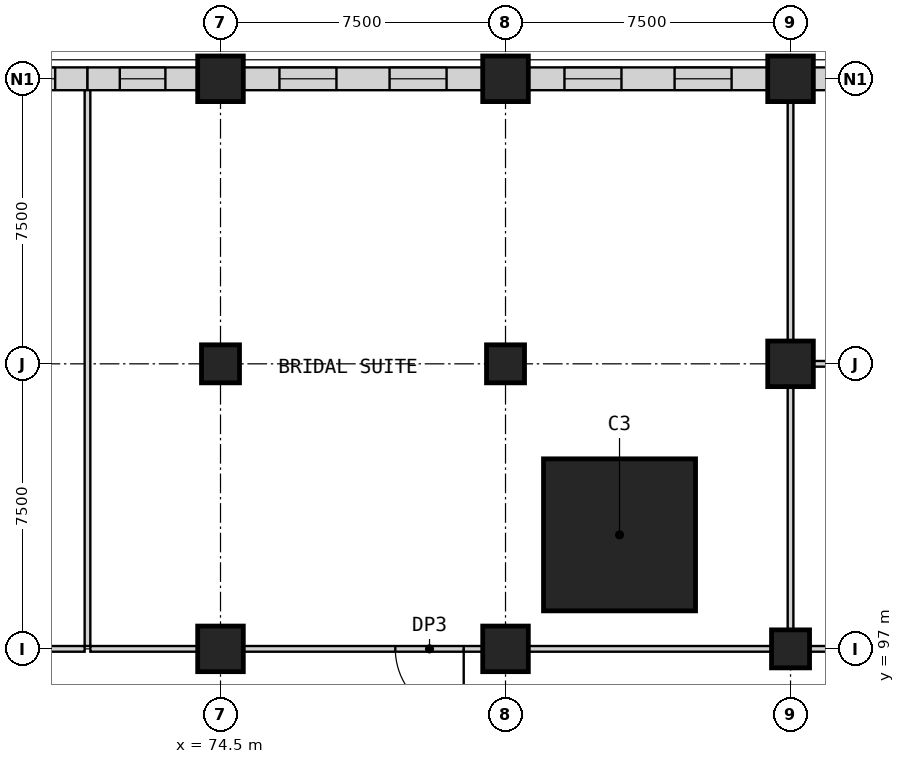
"""IFC4 building model, lengths in metres.
Left out: names, types, materials, properties, quantities, classifications, styles, units other than length and angle.
Written with IfcOpenShell. Run it as: python <this file> out.ifc"""

import sys

from ifc_helpers import new_model, si_unit, direction, frame, frame_2d, origin, origin_2d, place, context, subcontext, project, spatial, rectangle, extrude, element, fill, save


model = new_model("IFC4")
c1 = context("Model", 3, precision=1e-05, world=origin(), true_north=direction((0.0, 1.0)))
c2 = subcontext(c1, "Body", "Model", "MODEL_VIEW")
j1 = project(units=[si_unit("LENGTHUNIT", "METRE"), si_unit("PLANEANGLEUNIT", "RADIAN")], contexts=[c1])
p1 = place(None, origin())
s1 = spatial("IfcSite", under=j1, at=p1, CompositionType="ELEMENT")
p2 = place(p1, origin())
s2 = spatial("IfcBuilding", under=s1, at=p2, CompositionType="ELEMENT")
p3 = place(p2, frame((0.0, 0.0, 23.5)))
s3 = spatial("IfcBuildingStorey", under=s2, at=p3, CompositionType="ELEMENT", Elevation=23.5)
p4 = place(p3, frame((74.5, 97.0, 0.0), z_axis=(0.0, 0.0, 1.0), x_axis=(1.0, 0.0, 0.0)))
e1 = element("IfcColumn", 1, at=p4, inside=s3, PredefinedType="COLUMN", context=c2, shape_type="SweptSolid", body=[
    extrude(rectangle(XDim=1.2, YDim=1.2, at=origin_2d()), origin(), (0.0, 0.0, 1.0), 5.5),
])
p5 = place(p3, frame((74.5, 104.5, 0.0), z_axis=(0.0, 0.0, 1.0), x_axis=(1.0, 0.0, 0.0)))
e2 = element("IfcColumn", 2, at=p5, inside=s3, PredefinedType="COLUMN", context=c2, shape_type="SweptSolid", body=[
    extrude(rectangle(XDim=1.0, YDim=1.0, at=origin_2d()), origin(), (0.0, 0.0, 1.0), 5.5),
])
p6 = place(p3, frame((82.0, 97.0, 0.0), z_axis=(0.0, 0.0, 1.0), x_axis=(1.0, 0.0, 0.0)))
e3 = element("IfcColumn", 3, at=p6, inside=s3, PredefinedType="COLUMN", context=c2, shape_type="SweptSolid", body=[
    extrude(rectangle(XDim=1.2, YDim=1.2, at=origin_2d()), origin(), (0.0, 0.0, 1.0), 5.5),
])
for number, where, z_axis, x_axis in (
    (4, (82.0, 104.5, 0.0), (0.0, 0.0, 1.0), (1.0, 0.0, 0.0)),
    (5, (89.5, 97.0, 0.0), (0.0, 0.0, 1.0), (1.0, 0.0, 0.0)),
):
    element("IfcColumn", number, at=place(p3, frame(where, z_axis=z_axis, x_axis=x_axis)), inside=s3, PredefinedType="COLUMN", context=c2, shape_type="SweptSolid", body=[
        extrude(rectangle(XDim=1.0, YDim=1.0, at=origin_2d()), origin(), (0.0, 0.0, 1.0), 5.5),
    ])
p7 = place(p3, frame((85.0, 100.0, 0.0), z_axis=(0.0, 0.0, 1.0), x_axis=(1.0, 0.0, 0.0)))
e6 = element("IfcColumn", 6, at=p7, inside=s3, PredefinedType="COLUMN", context=c2, shape_type="SweptSolid", body=[
    extrude(rectangle(XDim=4.0, YDim=4.0, at=origin_2d()), origin(), (0.0, 0.0, 1.0), 5.5),
])
for number, where, z_axis, x_axis in (
    (7, (74.5, 112.0, 0.0), (0.0, 0.0, 1.0), (1.0, 0.0, 0.0)),
    (8, (82.0, 112.0, 0.0), (0.0, 0.0, 1.0), (1.0, 0.0, 0.0)),
    (9, (89.5, 104.5, 0.0), (0.0, 0.0, 1.0), (1.0, 0.0, 0.0)),
    (10, (89.5, 112.0, 0.0), (0.0, 0.0, 1.0), (1.0, 0.0, 0.0)),
):
    element("IfcColumn", number, at=place(p3, frame(where, z_axis=z_axis, x_axis=x_axis)), inside=s3, PredefinedType="COLUMN", context=c2, shape_type="SweptSolid", body=[
        extrude(rectangle(XDim=1.2, YDim=1.2, at=origin_2d()), origin(), (0.0, 0.0, 1.0), 5.5),
    ])
for number, where, z_axis, x_axis in (
    (11, (68.1, 97.0, 0.0), (0.0, 0.0, 1.0), (1.0, 0.0, 0.0)),
    (12, (71.075, 97.0, 0.0), (0.0, 0.0, 1.0), (1.0, 0.0, 0.0)),
):
    element("IfcWall", number, at=place(p3, frame(where, z_axis=z_axis, x_axis=x_axis)), inside=s3, PredefinedType="PARTITIONING", context=c2, shape_type="SweptSolid", body=[
        extrude(rectangle(XDim=2.825, YDim=0.15, at=frame_2d((1.413, 0.0))), origin(), (0.0, 0.0, 1.0), 5.2),
    ])
p8 = place(p3, frame((81.4, 97.0, 0.0), z_axis=(0.0, 0.0, 1.0), x_axis=(-1.0, 0.0, 0.0)))
e13 = element("IfcWall", 13, at=p8, inside=s3, PredefinedType="PARTITIONING", context=c2, shape_type="SweptSolid", body=[
    extrude(rectangle(XDim=6.3, YDim=0.15, at=frame_2d((3.15, 0.0))), origin(), (0.0, 0.0, 1.0), 5.2),
])
p9 = place(p8, frame((0.5, 0.0, 0.0)))
e14 = element("IfcOpeningElement", 14, at=p9, cuts=e13, PredefinedType="OPENING", context=c2, shape_type="SweptSolid", body=[
    extrude(rectangle(XDim=1.8, YDim=2.4, at=frame_2d((0.9, 1.2))), frame((0.0, 0.085, 0.0), z_axis=(0.0, -1.0, 0.0), x_axis=(1.0, 0.0, 0.0)), (0.0, 0.0, 1.0), 0.17),
])
for number, where, z_axis, x_axis in (
    (15, (82.6, 97.0, 0.0), (0.0, 0.0, 1.0), (1.0, 0.0, 0.0)),
    (16, (90.0, 97.0, 0.0), (0.0, 0.0, 1.0), (1.0, 0.0, 0.0)),
):
    element("IfcWall", number, at=place(p3, frame(where, z_axis=z_axis, x_axis=x_axis)), inside=s3, PredefinedType="PARTITIONING", context=c2, shape_type="SweptSolid", body=[
        extrude(rectangle(XDim=6.4, YDim=0.15, at=frame_2d((3.2, 0.0))), origin(), (0.0, 0.0, 1.0), 5.2),
    ])
p10 = place(p3, frame((68.1, 112.0, 0.0), z_axis=(0.0, 0.0, 1.0), x_axis=(1.0, 0.0, 0.0)))
e17 = element("IfcWall", 17, at=p10, inside=s3, PredefinedType="PARTITIONING", context=c2, shape_type="SweptSolid", body=[
    extrude(rectangle(XDim=2.9, YDim=0.6, at=frame_2d((1.45, 0.0))), origin(), (0.0, 0.0, 1.0), 4.6),
])
p11 = place(p10, frame((0.85, 0.0, 0.9)))
e18 = element("IfcOpeningElement", 18, at=p11, cuts=e17, PredefinedType="OPENING", context=c2, shape_type="SweptSolid", body=[
    extrude(rectangle(XDim=1.2, YDim=2.8, at=frame_2d((0.6, 1.4))), frame((0.0, 0.31, 0.0), z_axis=(0.0, -1.0, 0.0), x_axis=(1.0, 0.0, 0.0)), (0.0, 0.0, 1.0), 0.62),
])
p12 = place(p3, frame((71.0, 112.0, 0.0), z_axis=(0.0, 0.0, 1.0), x_axis=(1.0, 0.0, 0.0)))
e19 = element("IfcWall", 19, at=p12, inside=s3, PredefinedType="PARTITIONING", context=c2, shape_type="SweptSolid", body=[
    extrude(rectangle(XDim=2.9, YDim=0.6, at=frame_2d((1.45, 0.0))), origin(), (0.0, 0.0, 1.0), 4.6),
])
p13 = place(p12, frame((0.85, 0.0, 0.9)))
e20 = element("IfcOpeningElement", 20, at=p13, cuts=e19, PredefinedType="OPENING", context=c2, shape_type="SweptSolid", body=[
    extrude(rectangle(XDim=1.2, YDim=2.8, at=frame_2d((0.6, 1.4))), frame((0.0, 0.31, 0.0), z_axis=(0.0, -1.0, 0.0), x_axis=(1.0, 0.0, 0.0)), (0.0, 0.0, 1.0), 0.62),
])
p14 = place(p3, frame((75.1, 112.0, 0.0), z_axis=(0.0, 0.0, 1.0), x_axis=(1.0, 0.0, 0.0)))
e21 = element("IfcWall", 21, at=p14, inside=s3, PredefinedType="PARTITIONING", context=c2, shape_type="SweptSolid", body=[
    extrude(rectangle(XDim=6.3, YDim=0.6, at=frame_2d((3.15, 0.0))), origin(), (0.0, 0.0, 1.0), 4.6),
])
p15 = place(p14, frame((0.951, 0.0, 0.9)))
e22 = element("IfcOpeningElement", 22, at=p15, cuts=e21, PredefinedType="OPENING", context=c2, shape_type="SweptSolid", body=[
    extrude(rectangle(XDim=1.5, YDim=2.8, at=frame_2d((0.75, 1.4))), frame((0.0, 0.31, 0.0), z_axis=(0.0, -1.0, 0.0), x_axis=(1.0, 0.0, 0.0)), (0.0, 0.0, 1.0), 0.62),
])
p16 = place(p14, frame((3.849, 0.0, 0.9)))
e23 = element("IfcOpeningElement", 23, at=p16, cuts=e21, PredefinedType="OPENING", context=c2, shape_type="SweptSolid", body=[
    extrude(rectangle(XDim=1.5, YDim=2.8, at=frame_2d((0.75, 1.4))), frame((0.0, 0.31, 0.0), z_axis=(0.0, -1.0, 0.0), x_axis=(1.0, 0.0, 0.0)), (0.0, 0.0, 1.0), 0.62),
])
p17 = place(p3, frame((82.6, 112.0, 0.0), z_axis=(0.0, 0.0, 1.0), x_axis=(1.0, 0.0, 0.0)))
e24 = element("IfcWall", 24, at=p17, inside=s3, PredefinedType="PARTITIONING", context=c2, shape_type="SweptSolid", body=[
    extrude(rectangle(XDim=6.3, YDim=0.6, at=frame_2d((3.15, 0.0))), origin(), (0.0, 0.0, 1.0), 4.6),
])
p18 = place(p17, frame((0.951, 0.0, 0.9)))
e25 = element("IfcOpeningElement", 25, at=p18, cuts=e24, PredefinedType="OPENING", context=c2, shape_type="SweptSolid", body=[
    extrude(rectangle(XDim=1.5, YDim=2.8, at=frame_2d((0.75, 1.4))), frame((0.0, 0.31, 0.0), z_axis=(0.0, -1.0, 0.0), x_axis=(1.0, 0.0, 0.0)), (0.0, 0.0, 1.0), 0.62),
])
p19 = place(p17, frame((3.849, 0.0, 0.9)))
e26 = element("IfcOpeningElement", 26, at=p19, cuts=e24, PredefinedType="OPENING", context=c2, shape_type="SweptSolid", body=[
    extrude(rectangle(XDim=1.5, YDim=2.8, at=frame_2d((0.75, 1.4))), frame((0.0, 0.31, 0.0), z_axis=(0.0, -1.0, 0.0), x_axis=(1.0, 0.0, 0.0)), (0.0, 0.0, 1.0), 0.62),
])
p20 = place(p3, frame((90.1, 112.0, 0.0), z_axis=(0.0, 0.0, 1.0), x_axis=(1.0, 0.0, 0.0)))
e27 = element("IfcWall", 27, at=p20, inside=s3, PredefinedType="PARTITIONING", context=c2, shape_type="SweptSolid", body=[
    extrude(rectangle(XDim=6.3, YDim=0.6, at=frame_2d((3.15, 0.0))), origin(), (0.0, 0.0, 1.0), 4.6),
])
p21 = place(p20, frame((0.951, 0.0, 0.9)))
e28 = element("IfcOpeningElement", 28, at=p21, cuts=e27, PredefinedType="OPENING", context=c2, shape_type="SweptSolid", body=[
    extrude(rectangle(XDim=1.5, YDim=2.8, at=frame_2d((0.75, 1.4))), frame((0.0, 0.31, 0.0), z_axis=(0.0, -1.0, 0.0), x_axis=(1.0, 0.0, 0.0)), (0.0, 0.0, 1.0), 0.62),
])
p22 = place(p20, frame((3.849, 0.0, 0.9)))
e29 = element("IfcOpeningElement", 29, at=p22, cuts=e27, PredefinedType="OPENING", context=c2, shape_type="SweptSolid", body=[
    extrude(rectangle(XDim=1.5, YDim=2.8, at=frame_2d((0.75, 1.4))), frame((0.0, 0.31, 0.0), z_axis=(0.0, -1.0, 0.0), x_axis=(1.0, 0.0, 0.0)), (0.0, 0.0, 1.0), 0.62),
])
p23 = place(p3, frame((90.1, 104.5, 0.0), z_axis=(0.0, 0.0, 1.0), x_axis=(1.0, 0.0, 0.0)))
e30 = element("IfcWall", 30, at=p23, inside=s3, PredefinedType="PARTITIONING", context=c2, shape_type="SweptSolid", body=[
    extrude(rectangle(XDim=6.3, YDim=0.15, at=frame_2d((3.15, 0.0))), origin(), (0.0, 0.0, 1.0), 5.2),
])
p24 = place(p3, frame((89.5, 97.5, 0.0), z_axis=(0.0, 0.0, 1.0), x_axis=(0.0, 1.0, 0.0)))
e31 = element("IfcWall", 31, at=p24, inside=s3, PredefinedType="PARTITIONING", context=c2, shape_type="SweptSolid", body=[
    extrude(rectangle(XDim=6.4, YDim=0.15, at=frame_2d((3.2, 0.0))), origin(), (0.0, 0.0, 1.0), 5.2),
])
p25 = place(p3, frame((89.5, 105.1, 0.0), z_axis=(0.0, 0.0, 1.0), x_axis=(0.0, 1.0, 0.0)))
e32 = element("IfcWall", 32, at=p25, inside=s3, PredefinedType="PARTITIONING", context=c2, shape_type="SweptSolid", body=[
    extrude(rectangle(XDim=6.3, YDim=0.15, at=frame_2d((3.15, 0.0))), origin(), (0.0, 0.0, 1.0), 5.2),
])
p26 = place(p3, frame((71.0, 97.075, 0.0), z_axis=(0.0, 0.0, 1.0), x_axis=(0.0, 1.0, 0.0)))
e33 = element("IfcWall", 33, at=p26, inside=s3, PredefinedType="PARTITIONING", context=c2, shape_type="SweptSolid", body=[
    extrude(rectangle(XDim=14.625, YDim=0.15, at=frame_2d((7.312, 0.0))), origin(), (0.0, 0.0, 1.0), 5.2),
])
p27 = place(p9, origin())
e34 = element("IfcDoor", 34, at=p27, inside=s3, OperationType="SINGLE_SWING_LEFT", PredefinedType="DOOR", context=c2, shape_type="SweptSolid", body=[
    extrude(rectangle(XDim=1.8, YDim=2.4, at=frame_2d((0.9, 1.2))), frame((0.0, 0.025, 0.0), z_axis=(0.0, -1.0, 0.0), x_axis=(1.0, 0.0, 0.0)), (0.0, 0.0, 1.0), 0.05),
])
fill(e14, e34)
p28 = place(p11, origin())
e35 = element("IfcWindow", 35, at=p28, inside=s3, PartitioningType="SINGLE_PANEL", PredefinedType="WINDOW", context=c2, shape_type="SweptSolid", body=[
    extrude(rectangle(XDim=1.2, YDim=2.8, at=frame_2d((0.6, 1.4))), frame((0.0, 0.03, 0.0), z_axis=(0.0, -1.0, 0.0), x_axis=(1.0, 0.0, 0.0)), (0.0, 0.0, 1.0), 0.06),
])
fill(e18, e35)
p29 = place(p13, origin())
e36 = element("IfcWindow", 36, at=p29, inside=s3, PartitioningType="SINGLE_PANEL", PredefinedType="WINDOW", context=c2, shape_type="SweptSolid", body=[
    extrude(rectangle(XDim=1.2, YDim=2.8, at=frame_2d((0.6, 1.4))), frame((0.0, 0.03, 0.0), z_axis=(0.0, -1.0, 0.0), x_axis=(1.0, 0.0, 0.0)), (0.0, 0.0, 1.0), 0.06),
])
fill(e20, e36)
p30 = place(p15, origin())
e37 = element("IfcWindow", 37, at=p30, inside=s3, PartitioningType="SINGLE_PANEL", PredefinedType="WINDOW", context=c2, shape_type="SweptSolid", body=[
    extrude(rectangle(XDim=1.5, YDim=2.8, at=frame_2d((0.75, 1.4))), frame((0.0, 0.03, 0.0), z_axis=(0.0, -1.0, 0.0), x_axis=(1.0, 0.0, 0.0)), (0.0, 0.0, 1.0), 0.06),
])
fill(e22, e37)
p31 = place(p16, origin())
e38 = element("IfcWindow", 38, at=p31, inside=s3, PartitioningType="SINGLE_PANEL", PredefinedType="WINDOW", context=c2, shape_type="SweptSolid", body=[
    extrude(rectangle(XDim=1.5, YDim=2.8, at=frame_2d((0.75, 1.4))), frame((0.0, 0.03, 0.0), z_axis=(0.0, -1.0, 0.0), x_axis=(1.0, 0.0, 0.0)), (0.0, 0.0, 1.0), 0.06),
])
fill(e23, e38)
p32 = place(p18, origin())
e39 = element("IfcWindow", 39, at=p32, inside=s3, PartitioningType="SINGLE_PANEL", PredefinedType="WINDOW", context=c2, shape_type="SweptSolid", body=[
    extrude(rectangle(XDim=1.5, YDim=2.8, at=frame_2d((0.75, 1.4))), frame((0.0, 0.03, 0.0), z_axis=(0.0, -1.0, 0.0), x_axis=(1.0, 0.0, 0.0)), (0.0, 0.0, 1.0), 0.06),
])
fill(e25, e39)
p33 = place(p19, origin())
e40 = element("IfcWindow", 40, at=p33, inside=s3, PartitioningType="SINGLE_PANEL", PredefinedType="WINDOW", context=c2, shape_type="SweptSolid", body=[
    extrude(rectangle(XDim=1.5, YDim=2.8, at=frame_2d((0.75, 1.4))), frame((0.0, 0.03, 0.0), z_axis=(0.0, -1.0, 0.0), x_axis=(1.0, 0.0, 0.0)), (0.0, 0.0, 1.0), 0.06),
])
fill(e26, e40)
save(model, sys.argv[1])
